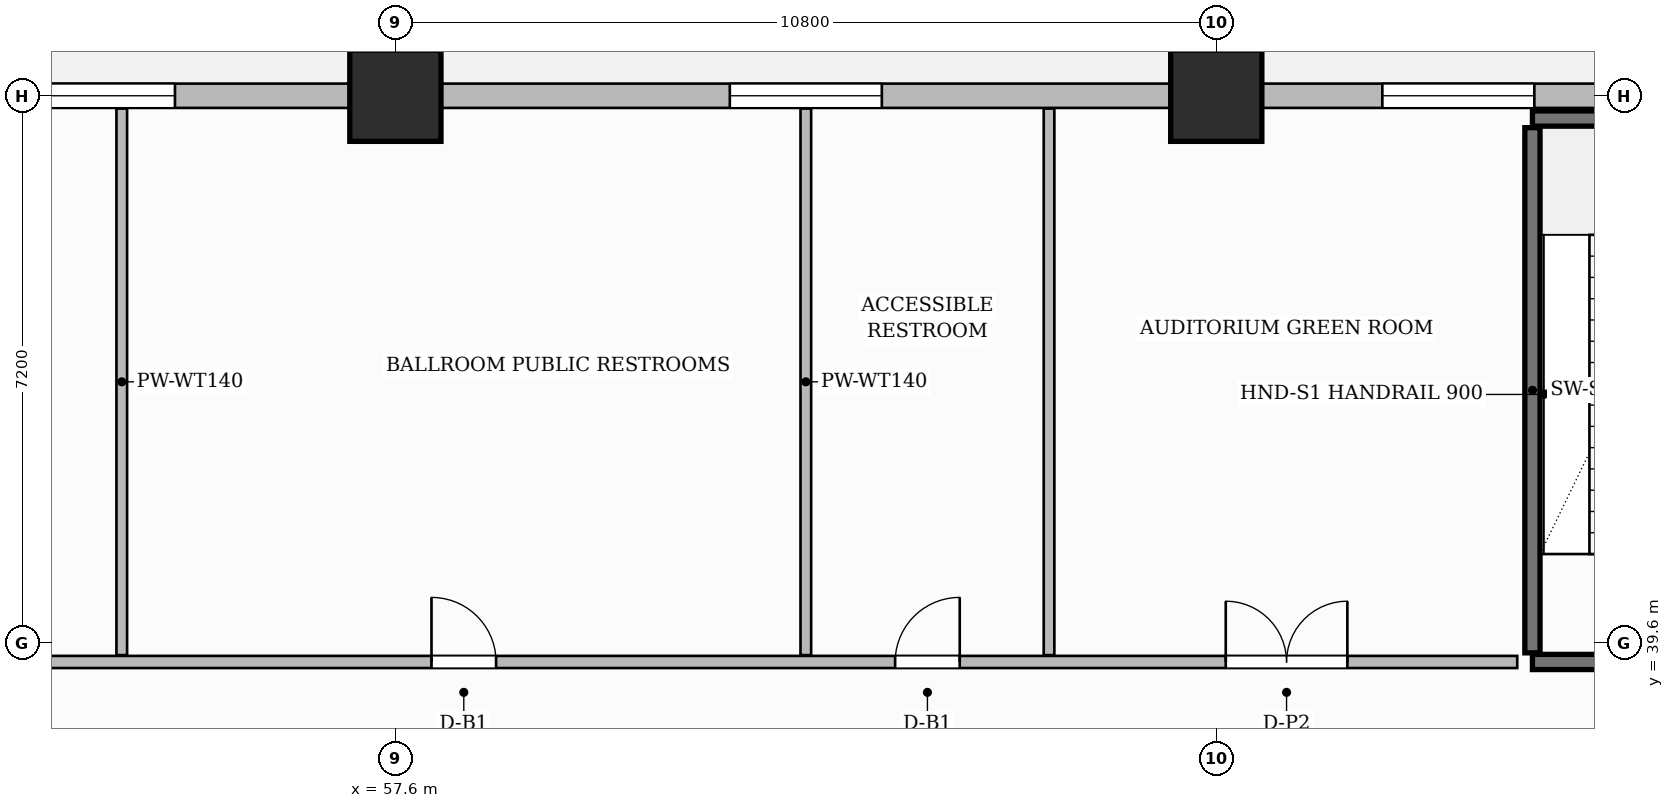
"""IFC4 building model, lengths in metres.
Left out: names, types, materials, properties, quantities, classifications, styles, units other than length and angle.
Written with IfcOpenShell. Run it as: python <this file> out.ifc"""

import sys

from ifc_helpers import new_model, si_unit, direction, frame, frame_2d, origin, origin_2d, place, context, subcontext, project, spatial, rectangle, extrude, source, transform, mapped, element, fill, save


model = new_model("IFC4")
c1 = context("Model", 3, precision=1e-05, world=origin(), true_north=direction((0.0, 1.0)))
c2 = subcontext(c1, "Body", "Model", "MODEL_VIEW")
j1 = project(units=[si_unit("LENGTHUNIT", "METRE"), si_unit("PLANEANGLEUNIT", "RADIAN")], contexts=[c1])
p1 = place(None, origin())
s1 = spatial("IfcSite", under=j1, at=p1, CompositionType="ELEMENT")
p2 = place(p1, origin())
s2 = spatial("IfcBuilding", under=s1, at=p2, CompositionType="ELEMENT")
p3 = place(p2, frame((0.0, 0.0, 16.2)))
s3 = spatial("IfcBuildingStorey", under=s2, at=p3, CompositionType="ELEMENT", Elevation=16.2)
m1 = source(origin(), c2, "Body", "SweptSolid", [
    extrude(rectangle(XDim=1.2, YDim=1.2, at=origin_2d()), origin(), (0.0, 0.0, 1.0), 5.4),
])
for number, where, z_axis, x_axis in (
    (1, (57.6, 46.8, 0.0), (0.0, 0.0, 1.0), (1.0, 0.0, 0.0)),
    (2, (68.4, 46.8, 0.0), (0.0, 0.0, 1.0), (1.0, 0.0, 0.0)),
):
    element("IfcColumn", number, at=place(p3, frame(where, z_axis=z_axis, x_axis=x_axis)), inside=s3, PredefinedType="COLUMN", context=c2, shape_type="MappedRepresentation", body=[
        mapped(m1, transform((0.0, 0.0, 0.0), scale=1.0)),
    ])
p4 = place(p3, frame((72.56, 39.47, 0.0), z_axis=(0.0, 0.0, 1.0), x_axis=(0.0, 1.0, 0.0)))
e3 = element("IfcWall", 3, at=p4, inside=s3, PredefinedType="SHEAR", context=c2, shape_type="SweptSolid", body=[
    extrude(rectangle(XDim=6.91, YDim=0.2, at=frame_2d((3.455, 0.0))), origin(), (0.0, 0.0, 1.0), 5.4),
])
p5 = place(p3, frame((72.56, 46.5, 0.0), z_axis=(0.0, 0.0, 1.0), x_axis=(1.0, 0.0, 0.0)))
e4 = element("IfcWall", 4, at=p5, inside=s3, PredefinedType="SHEAR", context=c2, shape_type="SweptSolid", body=[
    extrude(rectangle(XDim=2.94, YDim=0.2, at=frame_2d((1.47, 0.0))), origin(), (0.0, 0.0, 1.0), 5.4),
])
p6 = place(p3, frame((72.56, 39.35, 0.0), z_axis=(0.0, 0.0, 1.0), x_axis=(1.0, 0.0, 0.0)))
e5 = element("IfcWall", 5, at=p6, inside=s3, PredefinedType="SHEAR", context=c2, shape_type="SweptSolid", body=[
    extrude(rectangle(XDim=2.94, YDim=0.2, at=frame_2d((1.47, 0.0))), origin(), (0.0, 0.0, 1.0), 5.4),
])
p7 = place(p6, frame((0.985, 0.0, 0.0)))
e6 = element("IfcOpeningElement", 6, at=p7, cuts=e5, PredefinedType="OPENING", context=c2, shape_type="SweptSolid", body=[
    extrude(rectangle(XDim=1.05, YDim=2.2, at=frame_2d((0.525, 1.1))), frame((0.0, 0.11, 0.0), z_axis=(0.0, -1.0, 0.0), x_axis=(1.0, 0.0, 0.0)), (0.0, 0.0, 1.0), 0.22),
])
p8 = place(p3, frame((13.84, 39.35, 0.0), z_axis=(0.0, 0.0, 1.0), x_axis=(1.0, 0.0, 0.0)))
e7 = element("IfcWall", 7, at=p8, inside=s3, PredefinedType="PARTITIONING", context=c2, shape_type="SweptSolid", body=[
    extrude(rectangle(XDim=58.52, YDim=0.16, at=frame_2d((29.26, 0.0))), origin(), (0.0, 0.0, 1.0), 4.185),
])
p9 = place(p8, frame((10.535, 0.0, 0.0)))
e8 = element("IfcOpeningElement", 8, at=p9, cuts=e7, PredefinedType="OPENING", context=c2, shape_type="SweptSolid", body=[
    extrude(rectangle(XDim=1.6, YDim=2.4, at=frame_2d((0.8, 1.2))), frame((0.0, 0.09, 0.0), z_axis=(0.0, -1.0, 0.0), x_axis=(1.0, 0.0, 0.0)), (0.0, 0.0, 1.0), 0.18),
])
p10 = place(p8, frame((30.66, 0.0, 0.0)))
e9 = element("IfcOpeningElement", 9, at=p10, cuts=e7, PredefinedType="OPENING", context=c2, shape_type="SweptSolid", body=[
    extrude(rectangle(XDim=1.6, YDim=2.4, at=frame_2d((0.8, 1.2))), frame((0.0, 0.09, 0.0), z_axis=(0.0, -1.0, 0.0), x_axis=(1.0, 0.0, 0.0)), (0.0, 0.0, 1.0), 0.18),
])
p11 = place(p8, frame((44.235, 0.0, 0.0)))
e10 = element("IfcOpeningElement", 10, at=p11, cuts=e7, PredefinedType="OPENING", context=c2, shape_type="SweptSolid", body=[
    extrude(rectangle(XDim=0.85, YDim=2.1, at=frame_2d((0.425, 1.05))), frame((0.0, 0.09, 0.0), z_axis=(0.0, -1.0, 0.0), x_axis=(1.0, 0.0, 0.0)), (0.0, 0.0, 1.0), 0.18),
])
p12 = place(p8, frame((50.335, 0.0, 0.0)))
e11 = element("IfcOpeningElement", 11, at=p12, cuts=e7, PredefinedType="OPENING", context=c2, shape_type="SweptSolid", body=[
    extrude(rectangle(XDim=0.85, YDim=2.1, at=frame_2d((0.425, 1.05))), frame((0.0, 0.09, 0.0), z_axis=(0.0, -1.0, 0.0), x_axis=(1.0, 0.0, 0.0)), (0.0, 0.0, 1.0), 0.18),
])
p13 = place(p8, frame((54.685, 0.0, 0.0)))
e12 = element("IfcOpeningElement", 12, at=p13, cuts=e7, PredefinedType="OPENING", context=c2, shape_type="SweptSolid", body=[
    extrude(rectangle(XDim=1.6, YDim=2.4, at=frame_2d((0.8, 1.2))), frame((0.0, 0.09, 0.0), z_axis=(0.0, -1.0, 0.0), x_axis=(1.0, 0.0, 0.0)), (0.0, 0.0, 1.0), 0.18),
])
for number, where, z_axis, x_axis in (
    (13, (54.0, 39.44, 0.0), (0.0, 0.0, 1.0), (0.0, 1.0, 0.0)),
    (14, (63.0, 39.44, 0.0), (0.0, 0.0, 1.0), (0.0, 1.0, 0.0)),
    (15, (66.2, 39.44, 0.0), (0.0, 0.0, 1.0), (0.0, 1.0, 0.0)),
):
    element("IfcWall", number, at=place(p3, frame(where, z_axis=z_axis, x_axis=x_axis)), inside=s3, PredefinedType="PARTITIONING", context=c2, shape_type="SweptSolid", body=[
        extrude(rectangle(XDim=7.192, YDim=0.14, at=frame_2d((3.596, 0.0))), origin(), (0.0, 0.0, 1.0), 5.1),
    ])
p14 = place(p3, frame((49.8, 46.8, 0.0), z_axis=(0.0, 0.0, 1.0), x_axis=(1.0, 0.0, 0.0)))
e16 = element("IfcWall", 16, at=p14, inside=s3, PredefinedType="SOLIDWALL", context=c2, shape_type="SweptSolid", body=[
    extrude(rectangle(XDim=30.6, YDim=0.32, at=frame_2d((15.3, 0.0))), origin(), (0.0, 0.0, 1.0), 4.185),
])
p15 = place(p14, frame((2.9, 0.0, 0.75)))
e17 = element("IfcOpeningElement", 17, at=p15, cuts=e16, PredefinedType="OPENING", context=c2, shape_type="SweptSolid", body=[
    extrude(rectangle(XDim=2.0, YDim=2.6, at=frame_2d((1.0, 1.3))), frame((0.0, 0.17, 0.0), z_axis=(0.0, -1.0, 0.0), x_axis=(1.0, 0.0, 0.0)), (0.0, 0.0, 1.0), 0.34),
])
p16 = place(p14, frame((12.2, 0.0, 0.75)))
e18 = element("IfcOpeningElement", 18, at=p16, cuts=e16, PredefinedType="OPENING", context=c2, shape_type="SweptSolid", body=[
    extrude(rectangle(XDim=2.0, YDim=2.6, at=frame_2d((1.0, 1.3))), frame((0.0, 0.17, 0.0), z_axis=(0.0, -1.0, 0.0), x_axis=(1.0, 0.0, 0.0)), (0.0, 0.0, 1.0), 0.34),
])
p17 = place(p14, frame((20.785, 0.0, 0.75)))
e19 = element("IfcOpeningElement", 19, at=p17, cuts=e16, PredefinedType="OPENING", context=c2, shape_type="SweptSolid", body=[
    extrude(rectangle(XDim=2.0, YDim=2.6, at=frame_2d((1.0, 1.3))), frame((0.0, 0.17, 0.0), z_axis=(0.0, -1.0, 0.0), x_axis=(1.0, 0.0, 0.0)), (0.0, 0.0, 1.0), 0.34),
])
p18 = place(p14, frame((25.445, 0.0, 0.75)))
e20 = element("IfcOpeningElement", 20, at=p18, cuts=e16, PredefinedType="OPENING", context=c2, shape_type="SweptSolid", body=[
    extrude(rectangle(XDim=2.0, YDim=2.6, at=frame_2d((1.0, 1.3))), frame((0.0, 0.17, 0.0), z_axis=(0.0, -1.0, 0.0), x_axis=(1.0, 0.0, 0.0)), (0.0, 0.0, 1.0), 0.34),
])
m2 = source(origin(), c2, "Body", "SweptSolid", [
    extrude(rectangle(XDim=0.85, YDim=2.1, at=frame_2d((0.425, 1.05))), frame((0.0, 0.025, 0.0), z_axis=(0.0, -1.0, 0.0), x_axis=(1.0, 0.0, 0.0)), (0.0, 0.0, 1.0), 0.05),
])
p19 = place(p11, origin())
e21 = element("IfcDoor", 21, at=p19, inside=s3, OperationType="SINGLE_SWING_LEFT", PredefinedType="DOOR", context=c2, shape_type="MappedRepresentation", body=[
    mapped(m2, transform((0.0, 0.0, 0.0), scale=1.0)),
])
fill(e10, e21)
p20 = place(p12, origin())
e22 = element("IfcDoor", 22, at=p20, inside=s3, OperationType="SINGLE_SWING_RIGHT", PredefinedType="DOOR", context=c2, shape_type="MappedRepresentation", body=[
    mapped(m2, transform((0.0, 0.0, 0.0), scale=1.0)),
])
fill(e11, e22)
m3 = source(origin(), c2, "Body", "SweptSolid", [
    extrude(rectangle(XDim=1.6, YDim=2.4, at=frame_2d((0.8, 1.2))), frame((0.0, 0.025, 0.0), z_axis=(0.0, -1.0, 0.0), x_axis=(1.0, 0.0, 0.0)), (0.0, 0.0, 1.0), 0.05),
])
p21 = place(p13, origin())
e23 = element("IfcDoor", 23, at=p21, inside=s3, OperationType="DOUBLE_DOOR_SINGLE_SWING", PredefinedType="DOOR", context=c2, shape_type="MappedRepresentation", body=[
    mapped(m3, transform((0.0, 0.0, 0.0), scale=1.0)),
])
fill(e12, e23)
m4 = source(origin(), c2, "Body", "SweptSolid", [
    extrude(rectangle(XDim=2.0, YDim=2.6, at=frame_2d((1.0, 1.3))), frame((0.0, 0.03, 0.0), z_axis=(0.0, -1.0, 0.0), x_axis=(1.0, 0.0, 0.0)), (0.0, 0.0, 1.0), 0.06),
])
p22 = place(p15, origin())
e24 = element("IfcWindow", 24, at=p22, inside=s3, PartitioningType="DOUBLE_PANEL_VERTICAL", PredefinedType="WINDOW", context=c2, shape_type="MappedRepresentation", body=[
    mapped(m4, transform((0.0, 0.0, 0.0), scale=1.0)),
])
fill(e17, e24)
p23 = place(p16, origin())
e25 = element("IfcWindow", 25, at=p23, inside=s3, PartitioningType="DOUBLE_PANEL_VERTICAL", PredefinedType="WINDOW", context=c2, shape_type="MappedRepresentation", body=[
    mapped(m4, transform((0.0, 0.0, 0.0), scale=1.0)),
])
fill(e18, e25)
p24 = place(p17, origin())
e26 = element("IfcWindow", 26, at=p24, inside=s3, PartitioningType="DOUBLE_PANEL_VERTICAL", PredefinedType="WINDOW", context=c2, shape_type="MappedRepresentation", body=[
    mapped(m4, transform((0.0, 0.0, 0.0), scale=1.0)),
])
fill(e19, e26)
save(model, sys.argv[1])
